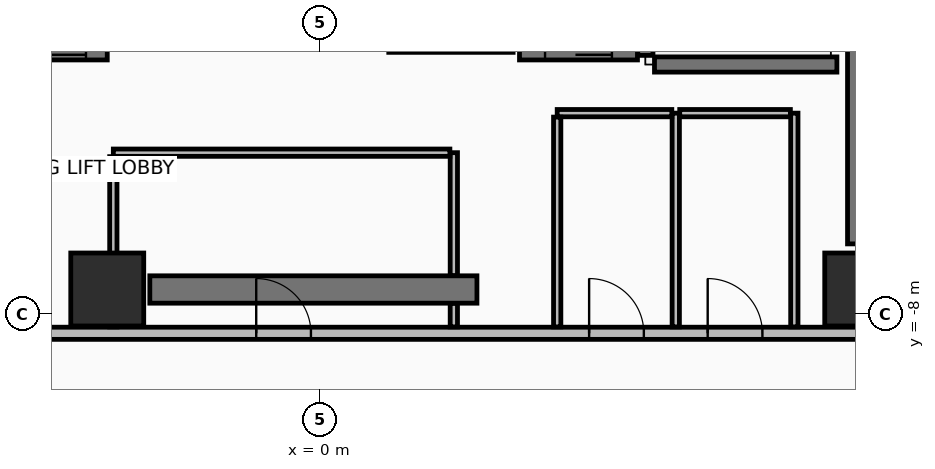
"""IFC4 building model, lengths in metres.
Left out: names, types, materials, properties, quantities, classifications, styles, units other than length and angle.
Written with IfcOpenShell. Run it as: python <this file> out.ifc"""

import sys

from ifc_helpers import new_model, si_unit, direction, frame, frame_2d, origin, origin_2d, place, context, subcontext, project, spatial, rectangle, extrude, element, fill, save


model = new_model("IFC4")
c1 = context("Model", 3, precision=1e-05, world=origin(), true_north=direction((0.0, 1.0)))
c2 = subcontext(c1, "Body", "Model", "MODEL_VIEW")
j1 = project(units=[si_unit("LENGTHUNIT", "METRE"), si_unit("PLANEANGLEUNIT", "RADIAN")], contexts=[c1])
p1 = place(None, origin())
s1 = spatial("IfcSite", under=j1, at=p1, CompositionType="ELEMENT")
p2 = place(p1, origin())
s2 = spatial("IfcBuilding", under=s1, at=p2, CompositionType="ELEMENT")
p3 = place(p2, frame((0.0, 0.0, 192.1)))
s3 = spatial("IfcBuildingStorey", under=s2, at=p3, CompositionType="ELEMENT", Elevation=192.1)
for number, where, z_axis, x_axis in (
    (1, (-3.5, -7.6, 0.0), (0.0, 0.0, 1.0), (1.0, 0.0, 0.0)),
    (2, (8.9, -7.6, 0.0), (0.0, 0.0, 1.0), (1.0, 0.0, 0.0)),
):
    element("IfcColumn", number, at=place(p3, frame(where, z_axis=z_axis, x_axis=x_axis)), inside=s3, PredefinedType="COLUMN", context=c2, shape_type="SweptSolid", body=[
        extrude(rectangle(XDim=1.2, YDim=1.2, at=origin_2d()), origin(), (0.0, 0.0, 1.0), 4.75),
    ])
p4 = place(p3, frame((-2.8, -7.6, 0.0), z_axis=(0.0, 0.0, 1.0), x_axis=(1.0, 0.0, 0.0)))
e3 = element("IfcWall", 3, at=p4, inside=s3, PredefinedType="SHEAR", context=c2, shape_type="SweptSolid", body=[
    extrude(rectangle(XDim=5.38, YDim=0.45, at=frame_2d((2.69, 0.0))), origin(), (0.0, 0.0, 1.0), 4.56),
])
p5 = place(p3, frame((8.9, -6.85, 0.0), z_axis=(0.0, 0.0, 1.0), x_axis=(0.0, 1.0, 0.0)))
e4 = element("IfcWall", 4, at=p5, inside=s3, PredefinedType="SHEAR", context=c2, shape_type="SweptSolid", body=[
    extrude(rectangle(XDim=10.7, YDim=0.45, at=frame_2d((5.35, 0.0))), origin(), (0.0, 0.0, 1.0), 4.56),
])
p6 = place(p3, frame((-9.62, -8.32, 0.0), z_axis=(0.0, 0.0, 1.0), x_axis=(1.0, 0.0, 0.0)))
e5 = element("IfcWall", 5, at=p6, inside=s3, PredefinedType="PARTITIONING", context=c2, shape_type="SweptSolid", body=[
    extrude(rectangle(XDim=19.24, YDim=0.2, at=frame_2d((9.62, 0.0))), origin(), (0.0, 0.0, 1.0), 2.355),
])
p7 = place(p6, frame((8.57, 0.0, 0.0)))
e6 = element("IfcOpeningElement", 6, at=p7, cuts=e5, PredefinedType="OPENING", context=c2, shape_type="SweptSolid", body=[
    extrude(rectangle(XDim=0.9, YDim=2.1, at=frame_2d((0.45, 1.05))), frame((0.0, 0.11, 0.0), z_axis=(0.0, -1.0, 0.0), x_axis=(1.0, 0.0, 0.0)), (0.0, 0.0, 1.0), 0.22),
])
p8 = place(p6, frame((14.045, 0.0, 0.0)))
e7 = element("IfcOpeningElement", 7, at=p8, cuts=e5, PredefinedType="OPENING", context=c2, shape_type="SweptSolid", body=[
    extrude(rectangle(XDim=0.9, YDim=2.1, at=frame_2d((0.45, 1.05))), frame((0.0, 0.11, 0.0), z_axis=(0.0, -1.0, 0.0), x_axis=(1.0, 0.0, 0.0)), (0.0, 0.0, 1.0), 0.22),
])
p9 = place(p6, frame((15.995, 0.0, 0.0)))
e8 = element("IfcOpeningElement", 8, at=p9, cuts=e5, PredefinedType="OPENING", context=c2, shape_type="SweptSolid", body=[
    extrude(rectangle(XDim=0.9, YDim=2.1, at=frame_2d((0.45, 1.05))), frame((0.0, 0.11, 0.0), z_axis=(0.0, -1.0, 0.0), x_axis=(1.0, 0.0, 0.0)), (0.0, 0.0, 1.0), 0.22),
])
p10 = place(p3, frame((5.35, -3.75, 0.0), z_axis=(0.0, 0.0, 1.0), x_axis=(0.0, 1.0, 0.0)))
e9 = element("IfcWall", 9, at=p10, inside=s3, PredefinedType="SHEAR", context=c2, shape_type="SweptSolid", body=[
    extrude(rectangle(XDim=7.3, YDim=0.25, at=frame_2d((3.65, 0.0))), origin(), (0.0, 0.0, 1.0), 4.56),
])
p11 = place(p3, frame((5.5, -3.9, 0.0), z_axis=(0.0, 0.0, 1.0), x_axis=(1.0, 0.0, 0.0)))
e10 = element("IfcWall", 10, at=p11, inside=s3, PredefinedType="SHEAR", context=c2, shape_type="SweptSolid", body=[
    extrude(rectangle(XDim=3.0, YDim=0.25, at=frame_2d((1.5, 0.0))), origin(), (0.0, 0.0, 1.0), 4.56),
])
p12 = place(p3, frame((1.13, -3.6, 0.0), z_axis=(0.0, 0.0, 1.0), x_axis=(1.0, 0.0, 0.0)))
e11 = element("IfcWall", 11, at=p12, inside=s3, PredefinedType="PARTITIONING", context=c2, shape_type="SweptSolid", body=[
    extrude(rectangle(XDim=2.045, YDim=0.2, at=frame_2d((1.022, 0.0))), origin(), (0.0, 0.0, 1.0), 4.56),
])
p13 = place(p3, frame((-5.4, -3.7, 0.0), z_axis=(0.0, 0.0, 1.0), x_axis=(1.0, 0.0, 0.0)))
e12 = element("IfcWall", 12, at=p13, inside=s3, PredefinedType="SHEAR", context=c2, shape_type="SweptSolid", body=[
    extrude(rectangle(XDim=1.9, YDim=0.25, at=frame_2d((0.95, 0.0))), origin(), (0.0, 0.0, 1.0), 4.56),
])
p14 = place(p13, frame((0.35, 0.0, 0.0)))
e13 = element("IfcOpeningElement", 13, at=p14, cuts=e12, PredefinedType="OPENING", context=c2, shape_type="SweptSolid", body=[
    extrude(rectangle(XDim=1.2, YDim=2.2, at=frame_2d((0.6, 1.1))), frame((0.0, 0.135, 0.0), z_axis=(0.0, -1.0, 0.0), x_axis=(1.0, 0.0, 0.0)), (0.0, 0.0, 1.0), 0.27),
])
p15 = place(p3, frame((3.28, -3.7, 0.0), z_axis=(0.0, 0.0, 1.0), x_axis=(1.0, 0.0, 0.0)))
e14 = element("IfcWall", 14, at=p15, inside=s3, PredefinedType="SHEAR", context=c2, shape_type="SweptSolid", body=[
    extrude(rectangle(XDim=1.94, YDim=0.25, at=frame_2d((0.97, 0.0))), origin(), (0.0, 0.0, 1.0), 4.56),
])
p16 = place(p15, frame((0.42, 0.0, 0.0)))
e15 = element("IfcOpeningElement", 15, at=p16, cuts=e14, PredefinedType="OPENING", context=c2, shape_type="SweptSolid", body=[
    extrude(rectangle(XDim=1.1, YDim=2.2, at=frame_2d((0.55, 1.1))), frame((0.0, 0.135, 0.0), z_axis=(0.0, -1.0, 0.0), x_axis=(1.0, 0.0, 0.0)), (0.0, 0.0, 1.0), 0.27),
])
p17 = place(p3, frame((2.2, -8.215, 0.0), z_axis=(0.0, 0.0, 1.0), x_axis=(0.0, 1.0, 0.0)))
e16 = element("IfcWall", 16, at=p17, inside=s3, PredefinedType="PARTITIONING", context=c2, shape_type="SweptSolid", body=[
    extrude(rectangle(XDim=0.385, YDim=0.12, at=frame_2d((0.192, 0.0))), origin(), (0.0, 0.0, 1.0), 3.855),
])
p18 = place(p3, frame((2.2, -7.37, 0.0), z_axis=(0.0, 0.0, 1.0), x_axis=(0.0, 1.0, 0.0)))
e17 = element("IfcWall", 17, at=p18, inside=s3, PredefinedType="PARTITIONING", context=c2, shape_type="SweptSolid", body=[
    extrude(rectangle(XDim=2.02, YDim=0.12, at=frame_2d((1.01, 0.0))), origin(), (0.0, 0.0, 1.0), 3.855),
])
p19 = place(p3, frame((2.135, -5.35, 0.0), z_axis=(0.0, 0.0, 1.0), x_axis=(-1.0, 0.0, 0.0)))
e18 = element("IfcWall", 18, at=p19, inside=s3, PredefinedType="PARTITIONING", context=c2, shape_type="SweptSolid", body=[
    extrude(rectangle(XDim=5.535, YDim=0.12, at=frame_2d((2.768, 0.0))), origin(), (0.0, 0.0, 1.0), 3.855),
])
p20 = place(p3, frame((-3.4, -5.415, 0.0), z_axis=(0.0, 0.0, 1.0), x_axis=(0.0, -1.0, 0.0)))
e19 = element("IfcWall", 19, at=p20, inside=s3, PredefinedType="PARTITIONING", context=c2, shape_type="SweptSolid", body=[
    extrude(rectangle(XDim=2.8, YDim=0.12, at=frame_2d((1.4, 0.0))), origin(), (0.0, 0.0, 1.0), 3.855),
])
p21 = place(p3, frame((5.85, -8.215, 0.0), z_axis=(0.0, 0.0, 1.0), x_axis=(0.0, 1.0, 0.0)))
e20 = element("IfcWall", 20, at=p21, inside=s3, PredefinedType="PARTITIONING", context=c2, shape_type="SweptSolid", body=[
    extrude(rectangle(XDim=3.515, YDim=0.12, at=frame_2d((1.758, 0.0))), origin(), (0.0, 0.0, 1.0), 3.855),
])
p22 = place(p3, frame((5.785, -4.7, 0.0), z_axis=(0.0, 0.0, 1.0), x_axis=(-1.0, 0.0, 0.0)))
e21 = element("IfcWall", 21, at=p22, inside=s3, PredefinedType="PARTITIONING", context=c2, shape_type="SweptSolid", body=[
    extrude(rectangle(XDim=1.885, YDim=0.12, at=frame_2d((0.942, 0.0))), origin(), (0.0, 0.0, 1.0), 4.56),
])
p23 = place(p3, frame((3.9, -4.765, 0.0), z_axis=(0.0, 0.0, 1.0), x_axis=(0.0, -1.0, 0.0)))
e22 = element("IfcWall", 22, at=p23, inside=s3, PredefinedType="PARTITIONING", context=c2, shape_type="SweptSolid", body=[
    extrude(rectangle(XDim=3.45, YDim=0.12, at=frame_2d((1.725, 0.0))), origin(), (0.0, 0.0, 1.0), 3.855),
])
p24 = place(p3, frame((7.8, -8.215, 0.0), z_axis=(0.0, 0.0, 1.0), x_axis=(0.0, 1.0, 0.0)))
e23 = element("IfcWall", 23, at=p24, inside=s3, PredefinedType="PARTITIONING", context=c2, shape_type="SweptSolid", body=[
    extrude(rectangle(XDim=3.515, YDim=0.12, at=frame_2d((1.758, 0.0))), origin(), (0.0, 0.0, 1.0), 3.855),
])
p25 = place(p3, frame((7.735, -4.7, 0.0), z_axis=(0.0, 0.0, 1.0), x_axis=(-1.0, 0.0, 0.0)))
e24 = element("IfcWall", 24, at=p25, inside=s3, PredefinedType="PARTITIONING", context=c2, shape_type="SweptSolid", body=[
    extrude(rectangle(XDim=1.82, YDim=0.12, at=frame_2d((0.91, 0.0))), origin(), (0.0, 0.0, 1.0), 4.56),
])
p26 = place(p14, origin())
e25 = element("IfcDoor", 25, at=p26, inside=s3, OperationType="SLIDING_TO_RIGHT", PredefinedType="DOOR", context=c2, shape_type="SweptSolid", body=[
    extrude(rectangle(XDim=1.2, YDim=2.2, at=frame_2d((0.6, 1.1))), frame((0.0, 0.025, 0.0), z_axis=(0.0, -1.0, 0.0), x_axis=(1.0, 0.0, 0.0)), (0.0, 0.0, 1.0), 0.05),
])
fill(e13, e25)
p27 = place(p16, origin())
e26 = element("IfcDoor", 26, at=p27, inside=s3, OperationType="SLIDING_TO_LEFT", PredefinedType="DOOR", context=c2, shape_type="SweptSolid", body=[
    extrude(rectangle(XDim=1.1, YDim=2.2, at=frame_2d((0.55, 1.1))), frame((0.0, 0.025, 0.0), z_axis=(0.0, -1.0, 0.0), x_axis=(1.0, 0.0, 0.0)), (0.0, 0.0, 1.0), 0.05),
])
fill(e15, e26)
p28 = place(p7, origin())
e27 = element("IfcDoor", 27, at=p28, inside=s3, OperationType="SINGLE_SWING_LEFT", PredefinedType="DOOR", context=c2, shape_type="SweptSolid", body=[
    extrude(rectangle(XDim=0.9, YDim=2.1, at=frame_2d((0.45, 1.05))), frame((0.0, 0.025, 0.0), z_axis=(0.0, -1.0, 0.0), x_axis=(1.0, 0.0, 0.0)), (0.0, 0.0, 1.0), 0.05),
])
fill(e6, e27)
p29 = place(p8, origin())
e28 = element("IfcDoor", 28, at=p29, inside=s3, OperationType="SINGLE_SWING_LEFT", PredefinedType="DOOR", context=c2, shape_type="SweptSolid", body=[
    extrude(rectangle(XDim=0.9, YDim=2.1, at=frame_2d((0.45, 1.05))), frame((0.0, 0.025, 0.0), z_axis=(0.0, -1.0, 0.0), x_axis=(1.0, 0.0, 0.0)), (0.0, 0.0, 1.0), 0.05),
])
fill(e7, e28)
p30 = place(p9, origin())
e29 = element("IfcDoor", 29, at=p30, inside=s3, OperationType="SINGLE_SWING_LEFT", PredefinedType="DOOR", context=c2, shape_type="SweptSolid", body=[
    extrude(rectangle(XDim=0.9, YDim=2.1, at=frame_2d((0.45, 1.05))), frame((0.0, 0.025, 0.0), z_axis=(0.0, -1.0, 0.0), x_axis=(1.0, 0.0, 0.0)), (0.0, 0.0, 1.0), 0.05),
])
fill(e8, e29)
save(model, sys.argv[1])
